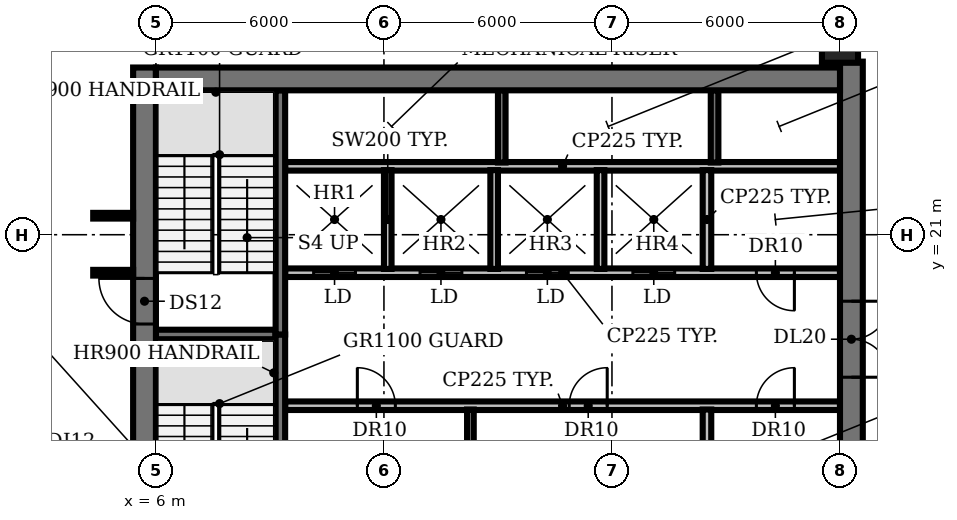
"""IFC4 building model, lengths in metres.
Left out: names, types, materials, properties, quantities, classifications, styles, units other than length and angle.
Written with IfcOpenShell. Run it as: python <this file> out.ifc"""

import sys

from ifc_helpers import new_model, si_unit, direction, frame, frame_2d, origin, origin_2d, place, context, subcontext, project, spatial, rectangle, circle, extrude, element, fill, save


model = new_model("IFC4")
c1 = context("Model", 3, precision=1e-05, world=origin(), true_north=direction((0.0, 1.0)))
c2 = subcontext(c1, "Body", "Model", "MODEL_VIEW")
j1 = project(units=[si_unit("LENGTHUNIT", "METRE"), si_unit("PLANEANGLEUNIT", "RADIAN")], contexts=[c1])
p1 = place(None, origin())
s1 = spatial("IfcSite", under=j1, at=p1, CompositionType="ELEMENT")
p2 = place(p1, origin())
s2 = spatial("IfcBuilding", under=s1, at=p2, CompositionType="ELEMENT")
p3 = place(p2, frame((0.0, 0.0, 150.8)))
s3 = spatial("IfcBuildingStorey", under=s2, at=p3, CompositionType="ELEMENT", Elevation=150.8)
p4 = place(p3, frame((24.0, 26.0, 0.0), z_axis=(0.0, 0.0, 1.0), x_axis=(1.0, 0.0, 0.0)))
e1 = element("IfcColumn", 1, at=p4, inside=s3, PredefinedType="COLUMN", context=c2, shape_type="SweptSolid", body=[
    extrude(circle(Radius=0.475, at=origin_2d()), origin(), (0.0, 0.0, 1.0), 3.85),
])
p5 = place(p3, frame((9.4, 16.5, 0.0), z_axis=(0.0, 0.0, 1.0), x_axis=(1.0, 0.0, 0.0)))
e2 = element("IfcWall", 2, at=p5, inside=s3, PredefinedType="PARTITIONING", context=c2, shape_type="SweptSolid", body=[
    extrude(rectangle(XDim=14.6, YDim=0.225, at=frame_2d((7.3, 0.0))), origin(), (0.0, 0.0, 1.0), 3.85),
])
p6 = place(p5, frame((1.9, 0.0, 0.0)))
e3 = element("IfcOpeningElement", 3, at=p6, cuts=e2, PredefinedType="OPENING", context=c2, shape_type="SweptSolid", body=[
    extrude(rectangle(XDim=1.0, YDim=2.1, at=frame_2d((0.5, 1.05))), frame((0.0, 0.123, 0.0), z_axis=(0.0, -1.0, 0.0), x_axis=(1.0, 0.0, 0.0)), (0.0, 0.0, 1.0), 0.245),
])
p7 = place(p5, frame((7.475, 0.0, 0.0)))
e4 = element("IfcOpeningElement", 4, at=p7, cuts=e2, PredefinedType="OPENING", context=c2, shape_type="SweptSolid", body=[
    extrude(rectangle(XDim=1.0, YDim=2.1, at=frame_2d((0.5, 1.05))), frame((0.0, 0.123, 0.0), z_axis=(0.0, -1.0, 0.0), x_axis=(1.0, 0.0, 0.0)), (0.0, 0.0, 1.0), 0.245),
])
p8 = place(p5, frame((12.4, 0.0, 0.0)))
e5 = element("IfcOpeningElement", 5, at=p8, cuts=e2, PredefinedType="OPENING", context=c2, shape_type="SweptSolid", body=[
    extrude(rectangle(XDim=1.0, YDim=2.1, at=frame_2d((0.5, 1.05))), frame((0.0, 0.123, 0.0), z_axis=(0.0, -1.0, 0.0), x_axis=(1.0, 0.0, 0.0)), (0.0, 0.0, 1.0), 0.245),
])
p9 = place(p3, frame((6.0, 18.375, 0.0), z_axis=(0.0, 0.0, 1.0), x_axis=(1.0, 0.0, 0.0)))
e6 = element("IfcWall", 6, at=p9, inside=s3, PredefinedType="SHEAR", context=c2, shape_type="SweptSolid", body=[
    extrude(rectangle(XDim=3.15, YDim=0.25, at=frame_2d((1.575, 0.0))), origin(), (0.0, 0.0, 1.0), 3.85),
])
p10 = place(p3, frame((24.0, 20.0, 0.0), z_axis=(0.0, 0.0, 1.0), x_axis=(-1.0, 0.0, 0.0)))
e7 = element("IfcWall", 7, at=p10, inside=s3, PredefinedType="PARTITIONING", context=c2, shape_type="SweptSolid", body=[
    extrude(rectangle(XDim=14.6, YDim=0.225, at=frame_2d((7.3, 0.0))), origin(), (0.0, 0.0, 1.0), 3.85),
])
p11 = place(p10, frame((12.75, 0.0, 0.0)))
e8 = element("IfcOpeningElement", 8, at=p11, cuts=e7, PredefinedType="OPENING", context=c2, shape_type="SweptSolid", body=[
    extrude(rectangle(XDim=1.1, YDim=2.1, at=frame_2d((0.55, 1.05))), frame((0.0, 0.123, 0.0), z_axis=(0.0, -1.0, 0.0), x_axis=(1.0, 0.0, 0.0)), (0.0, 0.0, 1.0), 0.245),
])
p12 = place(p10, frame((9.95, 0.0, 0.0)))
e9 = element("IfcOpeningElement", 9, at=p12, cuts=e7, PredefinedType="OPENING", context=c2, shape_type="SweptSolid", body=[
    extrude(rectangle(XDim=1.1, YDim=2.1, at=frame_2d((0.55, 1.05))), frame((0.0, 0.123, 0.0), z_axis=(0.0, -1.0, 0.0), x_axis=(1.0, 0.0, 0.0)), (0.0, 0.0, 1.0), 0.245),
])
p13 = place(p10, frame((7.15, 0.0, 0.0)))
e10 = element("IfcOpeningElement", 10, at=p13, cuts=e7, PredefinedType="OPENING", context=c2, shape_type="SweptSolid", body=[
    extrude(rectangle(XDim=1.1, YDim=2.1, at=frame_2d((0.55, 1.05))), frame((0.0, 0.123, 0.0), z_axis=(0.0, -1.0, 0.0), x_axis=(1.0, 0.0, 0.0)), (0.0, 0.0, 1.0), 0.245),
])
p14 = place(p10, frame((4.35, 0.0, 0.0)))
e11 = element("IfcOpeningElement", 11, at=p14, cuts=e7, PredefinedType="OPENING", context=c2, shape_type="SweptSolid", body=[
    extrude(rectangle(XDim=1.1, YDim=2.1, at=frame_2d((0.55, 1.05))), frame((0.0, 0.123, 0.0), z_axis=(0.0, -1.0, 0.0), x_axis=(1.0, 0.0, 0.0)), (0.0, 0.0, 1.0), 0.245),
])
p15 = place(p10, frame((1.2, 0.0, 0.0)))
e12 = element("IfcOpeningElement", 12, at=p15, cuts=e7, PredefinedType="OPENING", context=c2, shape_type="SweptSolid", body=[
    extrude(rectangle(XDim=1.0, YDim=2.1, at=frame_2d((0.5, 1.05))), frame((0.0, 0.123, 0.0), z_axis=(0.0, -1.0, 0.0), x_axis=(1.0, 0.0, 0.0)), (0.0, 0.0, 1.0), 0.245),
])
p16 = place(p3, frame((9.4, 22.8, 0.0), z_axis=(0.0, 0.0, 1.0), x_axis=(1.0, 0.0, 0.0)))
e13 = element("IfcWall", 13, at=p16, inside=s3, PredefinedType="PARTITIONING", context=c2, shape_type="SweptSolid", body=[
    extrude(rectangle(XDim=14.6, YDim=0.225, at=frame_2d((7.3, 0.0))), origin(), (0.0, 0.0, 1.0), 3.85),
])
p17 = place(p3, frame((9.275, 18.375, 0.0), z_axis=(0.0, 0.0, 1.0), x_axis=(0.0, -1.0, 0.0)))
e14 = element("IfcWall", 14, at=p17, inside=s3, PredefinedType="SHEAR", context=c2, shape_type="SweptSolid", body=[
    extrude(rectangle(XDim=6.55, YDim=0.25, at=frame_2d((3.275, 0.0))), origin(), (0.0, 0.0, 1.0), 3.85),
])
p18 = place(p17, frame((5.075, 0.0, 0.0)))
e15 = element("IfcOpeningElement", 15, at=p18, cuts=e14, PredefinedType="OPENING", context=c2, shape_type="SweptSolid", body=[
    extrude(rectangle(XDim=1.0, YDim=2.1, at=frame_2d((0.5, 1.05))), frame((0.0, 0.135, 0.0), z_axis=(0.0, -1.0, 0.0), x_axis=(1.0, 0.0, 0.0)), (0.0, 0.0, 1.0), 0.27),
])
p19 = place(p3, frame((9.275, 18.375, 0.0), z_axis=(0.0, 0.0, 1.0), x_axis=(0.0, 1.0, 0.0)))
e16 = element("IfcWall", 16, at=p19, inside=s3, PredefinedType="SHEAR", context=c2, shape_type="SweptSolid", body=[
    extrude(rectangle(XDim=6.425, YDim=0.25, at=frame_2d((3.212, 0.0))), origin(), (0.0, 0.0, 1.0), 3.85),
])
p20 = place(p3, frame((12.1, 20.1, 0.0), z_axis=(0.0, 0.0, 1.0), x_axis=(0.0, 1.0, 0.0)))
e17 = element("IfcWall", 17, at=p20, inside=s3, PredefinedType="SOLIDWALL", context=c2, shape_type="SweptSolid", body=[
    extrude(rectangle(XDim=2.6, YDim=0.2, at=frame_2d((1.3, 0.0))), origin(), (0.0, 0.0, 1.0), 3.85),
])
p21 = place(p3, frame((14.275, 13.8, 0.0), z_axis=(0.0, 0.0, 1.0), x_axis=(0.0, 1.0, 0.0)))
e18 = element("IfcWall", 18, at=p21, inside=s3, PredefinedType="PARTITIONING", context=c2, shape_type="SweptSolid", body=[
    extrude(rectangle(XDim=2.6, YDim=0.175, at=frame_2d((1.3, 0.0))), origin(), (0.0, 0.0, 1.0), 3.85),
])
p22 = place(p3, frame((14.9, 20.1, 0.0), z_axis=(0.0, 0.0, 1.0), x_axis=(0.0, 1.0, 0.0)))
e19 = element("IfcWall", 19, at=p22, inside=s3, PredefinedType="SOLIDWALL", context=c2, shape_type="SweptSolid", body=[
    extrude(rectangle(XDim=2.6, YDim=0.2, at=frame_2d((1.3, 0.0))), origin(), (0.0, 0.0, 1.0), 3.85),
])
p23 = place(p3, frame((15.1, 22.9, 0.0), z_axis=(0.0, 0.0, 1.0), x_axis=(0.0, 1.0, 0.0)))
e20 = element("IfcWall", 20, at=p23, inside=s3, PredefinedType="SHEAR", context=c2, shape_type="SweptSolid", body=[
    extrude(rectangle(XDim=1.9, YDim=0.2, at=frame_2d((0.95, 0.0))), origin(), (0.0, 0.0, 1.0), 3.85),
])
p24 = place(p3, frame((17.7, 20.1, 0.0), z_axis=(0.0, 0.0, 1.0), x_axis=(0.0, 1.0, 0.0)))
e21 = element("IfcWall", 21, at=p24, inside=s3, PredefinedType="SOLIDWALL", context=c2, shape_type="SweptSolid", body=[
    extrude(rectangle(XDim=2.6, YDim=0.2, at=frame_2d((1.3, 0.0))), origin(), (0.0, 0.0, 1.0), 3.85),
])
for number, where, z_axis, x_axis in (
    (22, (20.5, 13.8, 0.0), (0.0, 0.0, 1.0), (0.0, 1.0, 0.0)),
    (23, (20.5, 20.1, 0.0), (0.0, 0.0, 1.0), (0.0, 1.0, 0.0)),
):
    element("IfcWall", number, at=place(p3, frame(where, z_axis=z_axis, x_axis=x_axis)), inside=s3, PredefinedType="PARTITIONING", context=c2, shape_type="SweptSolid", body=[
        extrude(rectangle(XDim=2.6, YDim=0.225, at=frame_2d((1.3, 0.0))), origin(), (0.0, 0.0, 1.0), 3.85),
    ])
p25 = place(p3, frame((20.7, 22.9, 0.0), z_axis=(0.0, 0.0, 1.0), x_axis=(0.0, 1.0, 0.0)))
e24 = element("IfcWall", 24, at=p25, inside=s3, PredefinedType="SHEAR", context=c2, shape_type="SweptSolid", body=[
    extrude(rectangle(XDim=1.9, YDim=0.2, at=frame_2d((0.95, 0.0))), origin(), (0.0, 0.0, 1.0), 3.85),
])
p26 = place(p3, frame((5.7, 4.8, 0.0), z_axis=(0.0, 0.0, 1.0), x_axis=(0.0, 1.0, 0.0)))
e25 = element("IfcWall", 25, at=p26, inside=s3, PredefinedType="SHEAR", context=c2, shape_type="SweptSolid", body=[
    extrude(rectangle(XDim=20.6, YDim=0.6, at=frame_2d((10.3, 0.0))), origin(), (0.0, 0.0, 1.0), 3.85),
])
p27 = place(p26, frame((0.85, 0.0, 0.0)))
e26 = element("IfcOpeningElement", 26, at=p27, cuts=e25, PredefinedType="OPENING", context=c2, shape_type="SweptSolid", body=[
    extrude(rectangle(XDim=1.5, YDim=2.1, at=frame_2d((0.75, 1.05))), frame((0.0, 0.31, 0.0), z_axis=(0.0, -1.0, 0.0), x_axis=(1.0, 0.0, 0.0)), (0.0, 0.0, 1.0), 0.62),
])
p28 = place(p26, frame((7.3, 0.0, 0.0)))
e27 = element("IfcOpeningElement", 27, at=p28, cuts=e25, PredefinedType="OPENING", context=c2, shape_type="SweptSolid", body=[
    extrude(rectangle(XDim=1.2, YDim=2.1, at=frame_2d((0.6, 1.05))), frame((0.0, 0.31, 0.0), z_axis=(0.0, -1.0, 0.0), x_axis=(1.0, 0.0, 0.0)), (0.0, 0.0, 1.0), 0.62),
])
p29 = place(p26, frame((13.85, 0.0, 0.0)))
e28 = element("IfcOpeningElement", 28, at=p29, cuts=e25, PredefinedType="OPENING", context=c2, shape_type="SweptSolid", body=[
    extrude(rectangle(XDim=1.2, YDim=2.1, at=frame_2d((0.6, 1.05))), frame((0.0, 0.31, 0.0), z_axis=(0.0, -1.0, 0.0), x_axis=(1.0, 0.0, 0.0)), (0.0, 0.0, 1.0), 0.62),
])
p30 = place(p3, frame((24.3, 25.555, 0.0), z_axis=(0.0, 0.0, 1.0), x_axis=(0.0, -1.0, 0.0)))
e29 = element("IfcWall", 29, at=p30, inside=s3, PredefinedType="SHEAR", context=c2, shape_type="SweptSolid", body=[
    extrude(rectangle(XDim=20.755, YDim=0.6, at=frame_2d((10.377, 0.0))), origin(), (0.0, 0.0, 1.0), 3.85),
])
p31 = place(p30, frame((18.405, 0.0, 0.0)))
e30 = element("IfcOpeningElement", 30, at=p31, cuts=e29, PredefinedType="OPENING", context=c2, shape_type="SweptSolid", body=[
    extrude(rectangle(XDim=1.5, YDim=2.1, at=frame_2d((0.75, 1.05))), frame((0.0, 0.31, 0.0), z_axis=(0.0, -1.0, 0.0), x_axis=(1.0, 0.0, 0.0)), (0.0, 0.0, 1.0), 0.62),
])
p32 = place(p30, frame((12.305, 0.0, 0.0)))
e31 = element("IfcOpeningElement", 31, at=p32, cuts=e29, PredefinedType="OPENING", context=c2, shape_type="SweptSolid", body=[
    extrude(rectangle(XDim=0.9, YDim=2.1, at=frame_2d((0.45, 1.05))), frame((0.0, 0.31, 0.0), z_axis=(0.0, -1.0, 0.0), x_axis=(1.0, 0.0, 0.0)), (0.0, 0.0, 1.0), 0.62),
])
p33 = place(p30, frame((6.305, 0.0, 0.0)))
e32 = element("IfcOpeningElement", 32, at=p33, cuts=e29, PredefinedType="OPENING", context=c2, shape_type="SweptSolid", body=[
    extrude(rectangle(XDim=2.0, YDim=2.1, at=frame_2d((1.0, 1.05))), frame((0.0, 0.31, 0.0), z_axis=(0.0, -1.0, 0.0), x_axis=(1.0, 0.0, 0.0)), (0.0, 0.0, 1.0), 0.62),
])
p34 = place(p3, frame((6.0, 25.1, 0.0), z_axis=(0.0, 0.0, 1.0), x_axis=(1.0, 0.0, 0.0)))
e33 = element("IfcWall", 33, at=p34, inside=s3, PredefinedType="SHEAR", context=c2, shape_type="SweptSolid", body=[
    extrude(rectangle(XDim=18.0, YDim=0.6, at=frame_2d((9.0, 0.0))), origin(), (0.0, 0.0, 1.0), 3.85),
])
for number, where, z_axis, x_axis in (
    (34, (4.35, 20.0, 0.0), (0.0, 0.0, 1.0), (1.0, 0.0, 0.0)),
    (35, (4.35, 21.5, 0.0), (0.0, 0.0, 1.0), (1.0, 0.0, 0.0)),
):
    element("IfcWall", number, at=place(p3, frame(where, z_axis=z_axis, x_axis=x_axis)), inside=s3, PredefinedType="PARTITIONING", context=c2, shape_type="SweptSolid", body=[
        extrude(rectangle(XDim=1.05, YDim=0.15, at=frame_2d((0.525, 0.0))), origin(), (0.0, 0.0, 1.0), 2.88),
    ])
p35 = place(p6, origin())
e36 = element("IfcDoor", 36, at=p35, inside=s3, OperationType="SINGLE_SWING_LEFT", PredefinedType="DOOR", context=c2, shape_type="SweptSolid", body=[
    extrude(rectangle(XDim=1.0, YDim=2.1, at=frame_2d((0.5, 1.05))), frame((0.0, 0.025, 0.0), z_axis=(0.0, -1.0, 0.0), x_axis=(1.0, 0.0, 0.0)), (0.0, 0.0, 1.0), 0.05),
])
fill(e3, e36)
p36 = place(p7, origin())
e37 = element("IfcDoor", 37, at=p36, inside=s3, OperationType="SINGLE_SWING_RIGHT", PredefinedType="DOOR", context=c2, shape_type="SweptSolid", body=[
    extrude(rectangle(XDim=1.0, YDim=2.1, at=frame_2d((0.5, 1.05))), frame((0.0, 0.025, 0.0), z_axis=(0.0, -1.0, 0.0), x_axis=(1.0, 0.0, 0.0)), (0.0, 0.0, 1.0), 0.05),
])
fill(e4, e37)
p37 = place(p8, origin())
e38 = element("IfcDoor", 38, at=p37, inside=s3, OperationType="SINGLE_SWING_RIGHT", PredefinedType="DOOR", context=c2, shape_type="SweptSolid", body=[
    extrude(rectangle(XDim=1.0, YDim=2.1, at=frame_2d((0.5, 1.05))), frame((0.0, 0.025, 0.0), z_axis=(0.0, -1.0, 0.0), x_axis=(1.0, 0.0, 0.0)), (0.0, 0.0, 1.0), 0.05),
])
fill(e5, e38)
p38 = place(p11, origin())
e39 = element("IfcDoor", 39, at=p38, inside=s3, OperationType="DOUBLE_DOOR_SLIDING", PredefinedType="DOOR", context=c2, shape_type="SweptSolid", body=[
    extrude(rectangle(XDim=1.1, YDim=2.1, at=frame_2d((0.55, 1.05))), frame((0.0, 0.025, 0.0), z_axis=(0.0, -1.0, 0.0), x_axis=(1.0, 0.0, 0.0)), (0.0, 0.0, 1.0), 0.05),
])
fill(e8, e39)
p39 = place(p12, origin())
e40 = element("IfcDoor", 40, at=p39, inside=s3, OperationType="DOUBLE_DOOR_SLIDING", PredefinedType="DOOR", context=c2, shape_type="SweptSolid", body=[
    extrude(rectangle(XDim=1.1, YDim=2.1, at=frame_2d((0.55, 1.05))), frame((0.0, 0.025, 0.0), z_axis=(0.0, -1.0, 0.0), x_axis=(1.0, 0.0, 0.0)), (0.0, 0.0, 1.0), 0.05),
])
fill(e9, e40)
p40 = place(p13, origin())
e41 = element("IfcDoor", 41, at=p40, inside=s3, OperationType="DOUBLE_DOOR_SLIDING", PredefinedType="DOOR", context=c2, shape_type="SweptSolid", body=[
    extrude(rectangle(XDim=1.1, YDim=2.1, at=frame_2d((0.55, 1.05))), frame((0.0, 0.025, 0.0), z_axis=(0.0, -1.0, 0.0), x_axis=(1.0, 0.0, 0.0)), (0.0, 0.0, 1.0), 0.05),
])
fill(e10, e41)
p41 = place(p14, origin())
e42 = element("IfcDoor", 42, at=p41, inside=s3, OperationType="DOUBLE_DOOR_SLIDING", PredefinedType="DOOR", context=c2, shape_type="SweptSolid", body=[
    extrude(rectangle(XDim=1.1, YDim=2.1, at=frame_2d((0.55, 1.05))), frame((0.0, 0.025, 0.0), z_axis=(0.0, -1.0, 0.0), x_axis=(1.0, 0.0, 0.0)), (0.0, 0.0, 1.0), 0.05),
])
fill(e11, e42)
p42 = place(p15, origin())
e43 = element("IfcDoor", 43, at=p42, inside=s3, OperationType="SINGLE_SWING_LEFT", PredefinedType="DOOR", context=c2, shape_type="SweptSolid", body=[
    extrude(rectangle(XDim=1.0, YDim=2.1, at=frame_2d((0.5, 1.05))), frame((0.0, 0.025, 0.0), z_axis=(0.0, -1.0, 0.0), x_axis=(1.0, 0.0, 0.0)), (0.0, 0.0, 1.0), 0.05),
])
fill(e12, e43)
p43 = place(p29, origin())
e44 = element("IfcDoor", 44, at=p43, inside=s3, OperationType="SINGLE_SWING_RIGHT", PredefinedType="DOOR", context=c2, shape_type="SweptSolid", body=[
    extrude(rectangle(XDim=1.2, YDim=2.1, at=frame_2d((0.6, 1.05))), frame((0.0, 0.025, 0.0), z_axis=(0.0, -1.0, 0.0), x_axis=(1.0, 0.0, 0.0)), (0.0, 0.0, 1.0), 0.05),
])
fill(e28, e44)
p44 = place(p33, origin())
e45 = element("IfcDoor", 45, at=p44, inside=s3, OperationType="DOUBLE_DOOR_SINGLE_SWING", PredefinedType="DOOR", context=c2, shape_type="SweptSolid", body=[
    extrude(rectangle(XDim=2.0, YDim=2.1, at=frame_2d((1.0, 1.05))), frame((0.0, 0.025, 0.0), z_axis=(0.0, -1.0, 0.0), x_axis=(1.0, 0.0, 0.0)), (0.0, 0.0, 1.0), 0.05),
])
fill(e32, e45)
save(model, sys.argv[1])
